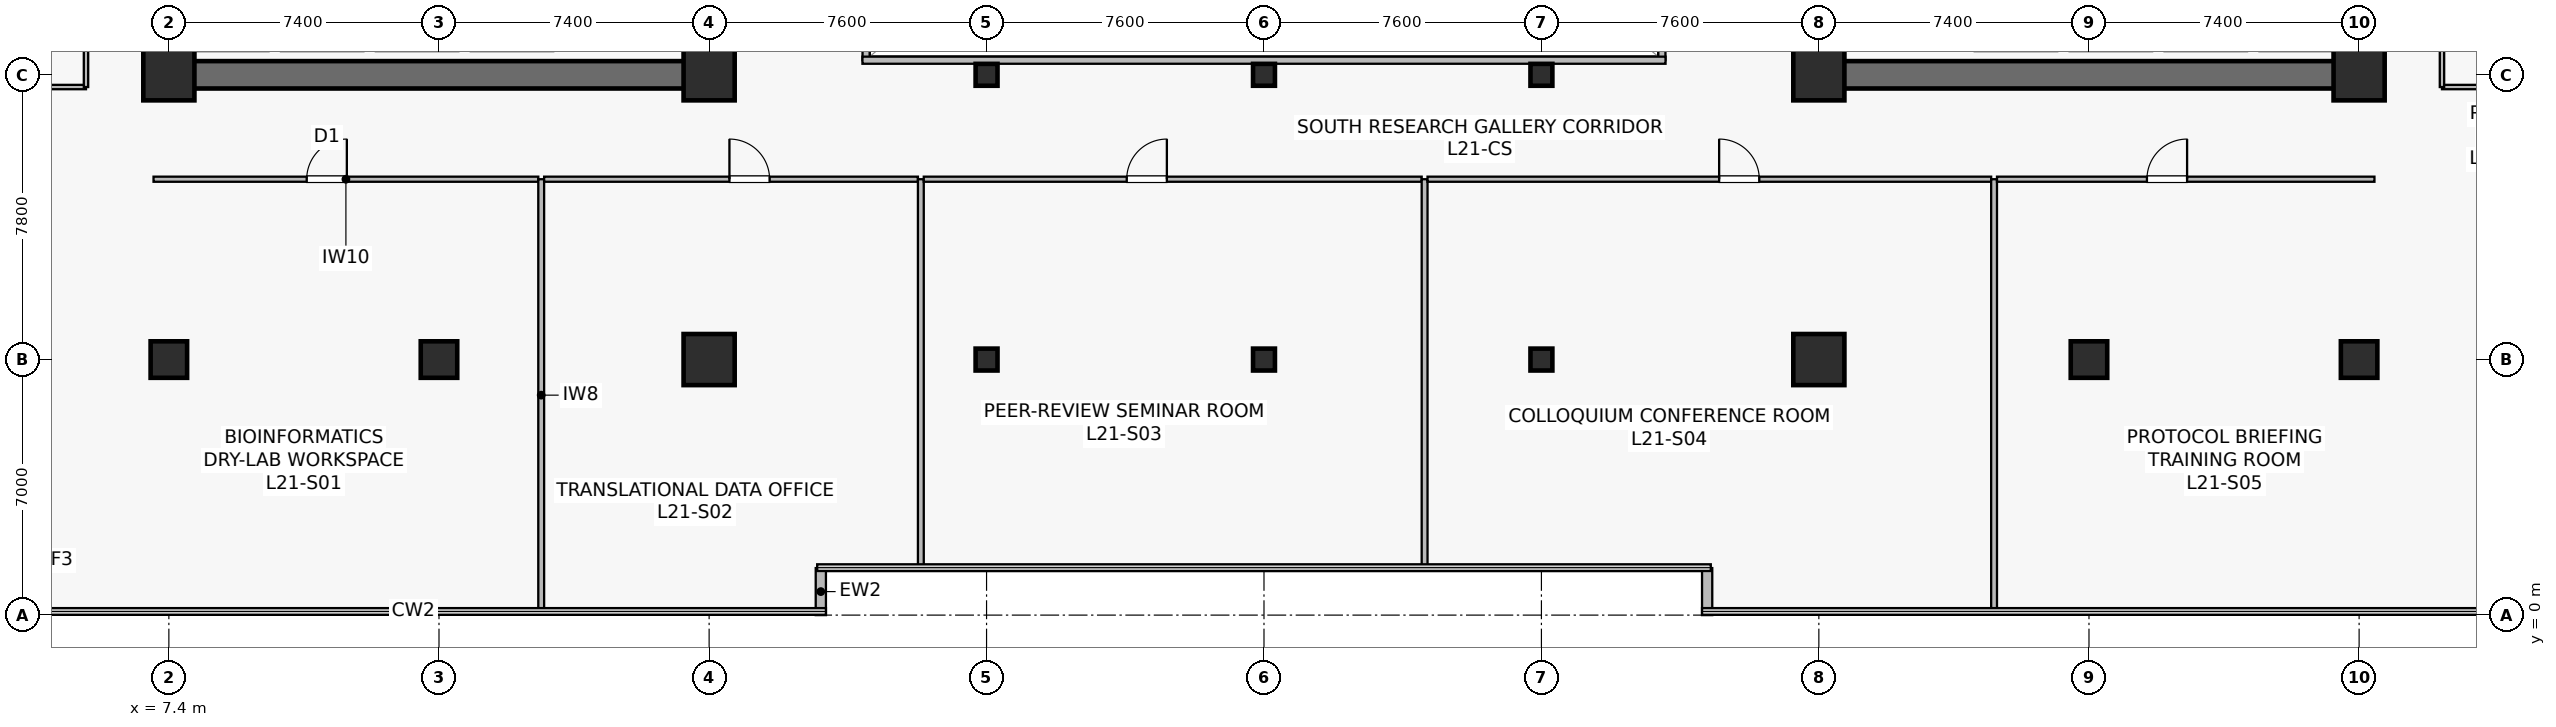
"""IFC4 building model, lengths in metres.
Left out: names, types, materials, properties, quantities, classifications, styles, units other than length and angle.
Written with IfcOpenShell. Run it as: python <this file> out.ifc"""

import sys

from ifc_helpers import new_model, si_unit, direction, frame, frame_2d, origin, origin_2d, place, context, subcontext, project, spatial, rectangle, hollow_rectangle, extrude, source, transform, mapped, element, fill, save


model = new_model("IFC4")
c1 = context("Model", 3, precision=1e-05, world=origin(), true_north=direction((0.0, 1.0)))
c2 = subcontext(c1, "Body", "Model", "MODEL_VIEW")
j1 = project(units=[si_unit("LENGTHUNIT", "METRE"), si_unit("PLANEANGLEUNIT", "RADIAN")], contexts=[c1])
p1 = place(None, origin())
s1 = spatial("IfcSite", under=j1, at=p1, CompositionType="ELEMENT")
p2 = place(p1, origin())
s2 = spatial("IfcBuilding", under=s1, at=p2, CompositionType="ELEMENT")
p3 = place(p2, frame((0.0, 0.0, 86.7)))
s3 = spatial("IfcBuildingStorey", under=s2, at=p3, CompositionType="ELEMENT", Elevation=86.7)
p4 = place(p3, frame((7.025, 14.8, 0.0), z_axis=(0.0, 0.0, 1.0), x_axis=(1.0, 0.0, 0.0)))
e1 = element("IfcWall", 1, at=p4, inside=s3, PredefinedType="SHEAR", context=c2, shape_type="SweptSolid", body=[
    extrude(rectangle(XDim=15.55, YDim=0.75, at=frame_2d((7.775, 0.0))), origin(), (0.0, 0.0, 1.0), 3.78),
])
p5 = place(p3, frame((7.4, 15.175, 0.0), z_axis=(0.0, 0.0, 1.0), x_axis=(0.0, 1.0, 0.0)))
e2 = element("IfcWall", 2, at=p5, inside=s3, PredefinedType="SHEAR", context=c2, shape_type="SweptSolid", body=[
    extrude(rectangle(XDim=18.25, YDim=0.75, at=frame_2d((9.125, 0.0))), origin(), (0.0, 0.0, 1.0), 3.78),
])
p6 = place(p3, frame((22.2, 15.175, 0.0), z_axis=(0.0, 0.0, 1.0), x_axis=(0.0, 1.0, 0.0)))
e3 = element("IfcWall", 3, at=p6, inside=s3, PredefinedType="SHEAR", context=c2, shape_type="SweptSolid", body=[
    extrude(rectangle(XDim=18.25, YDim=0.75, at=frame_2d((9.125, 0.0))), origin(), (0.0, 0.0, 1.0), 3.78),
])
p7 = place(p6, frame((3.375, 0.0, 0.0)))
e4 = element("IfcOpeningElement", 4, at=p7, cuts=e3, PredefinedType="OPENING", context=c2, shape_type="SweptSolid", body=[
    extrude(rectangle(XDim=1.42, YDim=2.2, at=frame_2d((0.71, 1.1))), frame((0.0, 0.385, 0.0), z_axis=(0.0, -1.0, 0.0), x_axis=(1.0, 0.0, 0.0)), (0.0, 0.0, 1.0), 0.77),
])
p8 = place(p3, frame((52.225, 14.8, 0.0), z_axis=(0.0, 0.0, 1.0), x_axis=(1.0, 0.0, 0.0)))
e5 = element("IfcWall", 5, at=p8, inside=s3, PredefinedType="SHEAR", context=c2, shape_type="SweptSolid", body=[
    extrude(rectangle(XDim=15.55, YDim=0.75, at=frame_2d((7.775, 0.0))), origin(), (0.0, 0.0, 1.0), 3.78),
])
p9 = place(p3, frame((52.6, 15.175, 0.0), z_axis=(0.0, 0.0, 1.0), x_axis=(0.0, 1.0, 0.0)))
e6 = element("IfcWall", 6, at=p9, inside=s3, PredefinedType="SHEAR", context=c2, shape_type="SweptSolid", body=[
    extrude(rectangle(XDim=18.25, YDim=0.75, at=frame_2d((9.125, 0.0))), origin(), (0.0, 0.0, 1.0), 3.78),
])
p10 = place(p9, frame((3.375, 0.0, 0.0)))
e7 = element("IfcOpeningElement", 7, at=p10, cuts=e6, PredefinedType="OPENING", context=c2, shape_type="SweptSolid", body=[
    extrude(rectangle(XDim=1.42, YDim=2.2, at=frame_2d((0.71, 1.1))), frame((0.0, 0.385, 0.0), z_axis=(0.0, -1.0, 0.0), x_axis=(1.0, 0.0, 0.0)), (0.0, 0.0, 1.0), 0.77),
])
p11 = place(p3, frame((67.4, 15.175, 0.0), z_axis=(0.0, 0.0, 1.0), x_axis=(0.0, 1.0, 0.0)))
e8 = element("IfcWall", 8, at=p11, inside=s3, PredefinedType="SHEAR", context=c2, shape_type="SweptSolid", body=[
    extrude(rectangle(XDim=18.25, YDim=0.75, at=frame_2d((9.125, 0.0))), origin(), (0.0, 0.0, 1.0), 3.78),
])
m1 = source(origin(), c2, "Body", "SweptSolid", [
    extrude(rectangle(XDim=1.0, YDim=1.0, at=origin_2d()), origin(), (0.0, 0.0, 1.0), 4.1),
])
p12 = place(p3, frame((14.8, 7.0, 0.0), z_axis=(0.0, 0.0, 1.0), x_axis=(1.0, 0.0, 0.0)))
e9 = element("IfcColumn", 9, at=p12, inside=s3, PredefinedType="COLUMN", context=c2, shape_type="MappedRepresentation", body=[
    mapped(m1, transform((0.0, 0.0, 0.0), scale=1.0)),
])
m2 = source(origin(), c2, "Body", "SweptSolid", [
    extrude(rectangle(XDim=1.4, YDim=1.4, at=origin_2d()), origin(), (0.0, 0.0, 1.0), 4.1),
])
for number, where, z_axis, x_axis in (
    (10, (22.2, 7.0, 0.0), (0.0, 0.0, 1.0), (1.0, 0.0, 0.0)),
    (11, (7.4, 14.8, 0.0), (0.0, 0.0, 1.0), (1.0, 0.0, 0.0)),
    (12, (22.2, 14.8, 0.0), (0.0, 0.0, 1.0), (1.0, 0.0, 0.0)),
    (13, (52.6, 7.0, 0.0), (0.0, 0.0, 1.0), (1.0, 0.0, 0.0)),
):
    element("IfcColumn", number, at=place(p3, frame(where, z_axis=z_axis, x_axis=x_axis)), inside=s3, PredefinedType="COLUMN", context=c2, shape_type="MappedRepresentation", body=[
        mapped(m2, transform((0.0, 0.0, 0.0), scale=1.0)),
    ])
p13 = place(p3, frame((60.0, 7.0, 0.0), z_axis=(0.0, 0.0, 1.0), x_axis=(1.0, 0.0, 0.0)))
e14 = element("IfcColumn", 14, at=p13, inside=s3, PredefinedType="COLUMN", context=c2, shape_type="MappedRepresentation", body=[
    mapped(m1, transform((0.0, 0.0, 0.0), scale=1.0)),
])
for number, where, z_axis, x_axis in (
    (15, (52.6, 14.8, 0.0), (0.0, 0.0, 1.0), (1.0, 0.0, 0.0)),
    (16, (67.4, 14.8, 0.0), (0.0, 0.0, 1.0), (1.0, 0.0, 0.0)),
):
    element("IfcColumn", number, at=place(p3, frame(where, z_axis=z_axis, x_axis=x_axis)), inside=s3, PredefinedType="COLUMN", context=c2, shape_type="MappedRepresentation", body=[
        mapped(m2, transform((0.0, 0.0, 0.0), scale=1.0)),
    ])
for number, where, z_axis, x_axis in (
    (17, (7.4, 7.0, 0.0), (0.0, 0.0, 1.0), (1.0, 0.0, 0.0)),
    (18, (67.4, 7.0, 0.0), (0.0, 0.0, 1.0), (1.0, 0.0, 0.0)),
):
    element("IfcColumn", number, at=place(p3, frame(where, z_axis=z_axis, x_axis=x_axis)), inside=s3, PredefinedType="COLUMN", context=c2, shape_type="MappedRepresentation", body=[
        mapped(m1, transform((0.0, 0.0, 0.0), scale=1.0)),
    ])
m3 = source(origin(), c2, "Body", "SweptSolid", [
    extrude(hollow_rectangle(XDim=0.6, YDim=0.6, WallThickness=0.028, at=origin_2d()), origin(), (0.0, 0.0, 1.0), 4.1),
])
for number, where, z_axis, x_axis in (
    (19, (29.8, 7.0, 0.0), (0.0, 0.0, 1.0), (1.0, 0.0, 0.0)),
    (20, (29.8, 14.8, 0.0), (0.0, 0.0, 1.0), (1.0, 0.0, 0.0)),
    (21, (37.4, 7.0, 0.0), (0.0, 0.0, 1.0), (1.0, 0.0, 0.0)),
    (22, (37.4, 14.8, 0.0), (0.0, 0.0, 1.0), (1.0, 0.0, 0.0)),
    (23, (45.0, 7.0, 0.0), (0.0, 0.0, 1.0), (1.0, 0.0, 0.0)),
    (24, (45.0, 14.8, 0.0), (0.0, 0.0, 1.0), (1.0, 0.0, 0.0)),
):
    element("IfcColumn", number, at=place(p3, frame(where, z_axis=z_axis, x_axis=x_axis)), inside=s3, PredefinedType="COLUMN", context=c2, shape_type="MappedRepresentation", body=[
        mapped(m3, transform((0.0, 0.0, 0.0), scale=1.0)),
    ])
for number, where, z_axis, x_axis in (
    (25, (25.26, 0.0, 0.0), (0.0, 0.0, 1.0), (0.0, 1.0, 0.0)),
    (26, (49.54, 1.288, 0.0), (0.0, 0.0, 1.0), (0.0, -1.0, 0.0)),
):
    element("IfcWall", number, at=place(p3, frame(where, z_axis=z_axis, x_axis=x_axis)), inside=s3, PredefinedType="STANDARD", context=c2, shape_type="SweptSolid", body=[
        extrude(rectangle(XDim=1.288, YDim=0.28, at=frame_2d((0.644, 0.0))), origin(), (0.0, 0.0, 1.0), 3.78),
    ])
p14 = place(p3, frame((26.5, 15.2, 0.0), z_axis=(0.0, 0.0, 1.0), x_axis=(0.0, 1.0, 0.0)))
e27 = element("IfcWall", 27, at=p14, inside=s3, PredefinedType="SOLIDWALL", context=c2, shape_type="SweptSolid", body=[
    extrude(rectangle(XDim=18.2, YDim=0.195, at=frame_2d((9.1, 0.0))), origin(), (0.0, 0.0, 1.0), 3.78),
])
p15 = place(p14, frame((1.8, 0.0, 0.9)))
e28 = element("IfcOpeningElement", 28, at=p15, cuts=e27, PredefinedType="OPENING", context=c2, shape_type="SweptSolid", body=[
    extrude(rectangle(XDim=1.2, YDim=1.35, at=frame_2d((0.6, 0.675))), frame((0.0, 0.107, 0.0), z_axis=(0.0, -1.0, 0.0), x_axis=(1.0, 0.0, 0.0)), (0.0, 0.0, 1.0), 0.215),
])
p16 = place(p14, frame((13.2, 0.0, 0.9)))
e29 = element("IfcOpeningElement", 29, at=p16, cuts=e27, PredefinedType="OPENING", context=c2, shape_type="SweptSolid", body=[
    extrude(rectangle(XDim=1.2, YDim=1.35, at=frame_2d((0.6, 0.675))), frame((0.0, 0.107, 0.0), z_axis=(0.0, -1.0, 0.0), x_axis=(1.0, 0.0, 0.0)), (0.0, 0.0, 1.0), 0.215),
])
p17 = place(p3, frame((48.3, 15.2, 0.0), z_axis=(0.0, 0.0, 1.0), x_axis=(0.0, 1.0, 0.0)))
e30 = element("IfcWall", 30, at=p17, inside=s3, PredefinedType="SOLIDWALL", context=c2, shape_type="SweptSolid", body=[
    extrude(rectangle(XDim=18.2, YDim=0.195, at=frame_2d((9.1, 0.0))), origin(), (0.0, 0.0, 1.0), 3.78),
])
p18 = place(p17, frame((1.8, 0.0, 0.9)))
e31 = element("IfcOpeningElement", 31, at=p18, cuts=e30, PredefinedType="OPENING", context=c2, shape_type="SweptSolid", body=[
    extrude(rectangle(XDim=1.2, YDim=1.35, at=frame_2d((0.6, 0.675))), frame((0.0, 0.107, 0.0), z_axis=(0.0, -1.0, 0.0), x_axis=(1.0, 0.0, 0.0)), (0.0, 0.0, 1.0), 0.215),
])
p19 = place(p17, frame((13.2, 0.0, 0.9)))
e32 = element("IfcOpeningElement", 32, at=p19, cuts=e30, PredefinedType="OPENING", context=c2, shape_type="SweptSolid", body=[
    extrude(rectangle(XDim=1.2, YDim=1.35, at=frame_2d((0.6, 0.675))), frame((0.0, 0.107, 0.0), z_axis=(0.0, -1.0, 0.0), x_axis=(1.0, 0.0, 0.0)), (0.0, 0.0, 1.0), 0.215),
])
p20 = place(p3, frame((26.4, 15.2, 0.0), z_axis=(0.0, 0.0, 1.0), x_axis=(1.0, 0.0, 0.0)))
e33 = element("IfcWall", 33, at=p20, inside=s3, PredefinedType="SOLIDWALL", context=c2, shape_type="SweptSolid", body=[
    extrude(rectangle(XDim=22.0, YDim=0.195, at=frame_2d((11.0, 0.0))), origin(), (0.0, 0.0, 1.0), 3.78),
])
p21 = place(p3, frame((6.98, 11.94, 0.0), z_axis=(0.0, 0.0, 1.0), x_axis=(1.0, 0.0, 0.0)))
e34 = element("IfcWall", 34, at=p21, inside=s3, PredefinedType="PARTITIONING", context=c2, shape_type="SweptSolid", body=[
    extrude(rectangle(XDim=10.54, YDim=0.14, at=frame_2d((5.27, 0.0))), origin(), (0.0, 0.0, 1.0), 3.115),
])
p22 = place(p21, frame((4.196, 0.0, 0.0)))
e35 = element("IfcOpeningElement", 35, at=p22, cuts=e34, PredefinedType="OPENING", context=c2, shape_type="SweptSolid", body=[
    extrude(rectangle(XDim=1.1, YDim=2.18, at=frame_2d((0.55, 1.09))), frame((0.0, 0.08, 0.0), z_axis=(0.0, -1.0, 0.0), x_axis=(1.0, 0.0, 0.0)), (0.0, 0.0, 1.0), 0.16),
])
p23 = place(p3, frame((17.6, 0.11, 0.0), z_axis=(0.0, 0.0, 1.0), x_axis=(0.0, 1.0, 0.0)))
e36 = element("IfcWall", 36, at=p23, inside=s3, PredefinedType="PARTITIONING", context=c2, shape_type="SweptSolid", body=[
    extrude(rectangle(XDim=11.83, YDim=0.16, at=frame_2d((5.915, 0.0))), origin(), (0.0, 0.0, 1.0), 3.015),
])
p24 = place(p3, frame((17.68, 11.94, 0.0), z_axis=(0.0, 0.0, 1.0), x_axis=(1.0, 0.0, 0.0)))
e37 = element("IfcWall", 37, at=p24, inside=s3, PredefinedType="PARTITIONING", context=c2, shape_type="SweptSolid", body=[
    extrude(rectangle(XDim=10.24, YDim=0.14, at=frame_2d((5.12, 0.0))), origin(), (0.0, 0.0, 1.0), 3.115),
])
p25 = place(p24, frame((5.076, 0.0, 0.0)))
e38 = element("IfcOpeningElement", 38, at=p25, cuts=e37, PredefinedType="OPENING", context=c2, shape_type="SweptSolid", body=[
    extrude(rectangle(XDim=1.1, YDim=2.18, at=frame_2d((0.55, 1.09))), frame((0.0, 0.08, 0.0), z_axis=(0.0, -1.0, 0.0), x_axis=(1.0, 0.0, 0.0)), (0.0, 0.0, 1.0), 0.16),
])
p26 = place(p3, frame((28.0, 1.31, 0.0), z_axis=(0.0, 0.0, 1.0), x_axis=(0.0, 1.0, 0.0)))
e39 = element("IfcWall", 39, at=p26, inside=s3, PredefinedType="PARTITIONING", context=c2, shape_type="SweptSolid", body=[
    extrude(rectangle(XDim=10.63, YDim=0.16, at=frame_2d((5.315, 0.0))), origin(), (0.0, 0.0, 1.0), 3.015),
])
p27 = place(p3, frame((28.08, 11.94, 0.0), z_axis=(0.0, 0.0, 1.0), x_axis=(1.0, 0.0, 0.0)))
e40 = element("IfcWall", 40, at=p27, inside=s3, PredefinedType="PARTITIONING", context=c2, shape_type="SweptSolid", body=[
    extrude(rectangle(XDim=13.64, YDim=0.14, at=frame_2d((6.82, 0.0))), origin(), (0.0, 0.0, 1.0), 3.115),
])
p28 = place(p27, frame((5.56, 0.0, 0.0)))
e41 = element("IfcOpeningElement", 41, at=p28, cuts=e40, PredefinedType="OPENING", context=c2, shape_type="SweptSolid", body=[
    extrude(rectangle(XDim=1.1, YDim=2.18, at=frame_2d((0.55, 1.09))), frame((0.0, 0.08, 0.0), z_axis=(0.0, -1.0, 0.0), x_axis=(1.0, 0.0, 0.0)), (0.0, 0.0, 1.0), 0.16),
])
p29 = place(p3, frame((41.8, 1.31, 0.0), z_axis=(0.0, 0.0, 1.0), x_axis=(0.0, 1.0, 0.0)))
e42 = element("IfcWall", 42, at=p29, inside=s3, PredefinedType="PARTITIONING", context=c2, shape_type="SweptSolid", body=[
    extrude(rectangle(XDim=10.63, YDim=0.16, at=frame_2d((5.315, 0.0))), origin(), (0.0, 0.0, 1.0), 3.015),
])
p30 = place(p3, frame((41.88, 11.94, 0.0), z_axis=(0.0, 0.0, 1.0), x_axis=(1.0, 0.0, 0.0)))
e43 = element("IfcWall", 43, at=p30, inside=s3, PredefinedType="PARTITIONING", context=c2, shape_type="SweptSolid", body=[
    extrude(rectangle(XDim=15.44, YDim=0.14, at=frame_2d((7.72, 0.0))), origin(), (0.0, 0.0, 1.0), 3.115),
])
p31 = place(p30, frame((7.988, 0.0, 0.0)))
e44 = element("IfcOpeningElement", 44, at=p31, cuts=e43, PredefinedType="OPENING", context=c2, shape_type="SweptSolid", body=[
    extrude(rectangle(XDim=1.1, YDim=2.18, at=frame_2d((0.55, 1.09))), frame((0.0, 0.08, 0.0), z_axis=(0.0, -1.0, 0.0), x_axis=(1.0, 0.0, 0.0)), (0.0, 0.0, 1.0), 0.16),
])
p32 = place(p3, frame((57.4, 0.11, 0.0), z_axis=(0.0, 0.0, 1.0), x_axis=(0.0, 1.0, 0.0)))
e45 = element("IfcWall", 45, at=p32, inside=s3, PredefinedType="PARTITIONING", context=c2, shape_type="SweptSolid", body=[
    extrude(rectangle(XDim=11.83, YDim=0.16, at=frame_2d((5.915, 0.0))), origin(), (0.0, 0.0, 1.0), 3.015),
])
p33 = place(p3, frame((57.48, 11.94, 0.0), z_axis=(0.0, 0.0, 1.0), x_axis=(1.0, 0.0, 0.0)))
e46 = element("IfcWall", 46, at=p33, inside=s3, PredefinedType="PARTITIONING", context=c2, shape_type="SweptSolid", body=[
    extrude(rectangle(XDim=10.34, YDim=0.14, at=frame_2d((5.17, 0.0))), origin(), (0.0, 0.0, 1.0), 3.115),
])
p34 = place(p33, frame((4.108, 0.0, 0.0)))
e47 = element("IfcOpeningElement", 47, at=p34, cuts=e46, PredefinedType="OPENING", context=c2, shape_type="SweptSolid", body=[
    extrude(rectangle(XDim=1.1, YDim=2.18, at=frame_2d((0.55, 1.09))), frame((0.0, 0.08, 0.0), z_axis=(0.0, -1.0, 0.0), x_axis=(1.0, 0.0, 0.0)), (0.0, 0.0, 1.0), 0.16),
])
p35 = place(p3, frame((0.11, 14.465, 0.0), z_axis=(0.0, 0.0, 1.0), x_axis=(1.0, 0.0, 0.0)))
e48 = element("IfcWall", 48, at=p35, inside=s3, PredefinedType="PARTITIONING", context=c2, shape_type="SweptSolid", body=[
    extrude(rectangle(XDim=5.02, YDim=0.12, at=frame_2d((2.51, 0.0))), origin(), (0.0, 0.0, 1.0), 3.78),
])
p36 = place(p3, frame((5.13, 14.465, 0.0), z_axis=(0.0, 0.0, 1.0), x_axis=(0.0, 1.0, 0.0)))
e49 = element("IfcWall", 49, at=p36, inside=s3, PredefinedType="PARTITIONING", context=c2, shape_type="SweptSolid", body=[
    extrude(rectangle(XDim=9.275, YDim=0.12, at=frame_2d((4.637, 0.0))), origin(), (0.0, 0.0, 1.0), 3.78),
])
p37 = place(p36, frame((4.188, 0.0, 0.0)))
e50 = element("IfcOpeningElement", 50, at=p37, cuts=e49, PredefinedType="OPENING", context=c2, shape_type="SweptSolid", body=[
    extrude(rectangle(XDim=0.9, YDim=2.1, at=frame_2d((0.45, 1.05))), frame((0.0, 0.07, 0.0), z_axis=(0.0, -1.0, 0.0), x_axis=(1.0, 0.0, 0.0)), (0.0, 0.0, 1.0), 0.14),
])
p38 = place(p3, frame((69.67, 14.465, 0.0), z_axis=(0.0, 0.0, 1.0), x_axis=(1.0, 0.0, 0.0)))
e51 = element("IfcWall", 51, at=p38, inside=s3, PredefinedType="PARTITIONING", context=c2, shape_type="SweptSolid", body=[
    extrude(rectangle(XDim=5.02, YDim=0.12, at=frame_2d((2.51, 0.0))), origin(), (0.0, 0.0, 1.0), 3.78),
])
p39 = place(p3, frame((69.67, 14.465, 0.0), z_axis=(0.0, 0.0, 1.0), x_axis=(0.0, 1.0, 0.0)))
e52 = element("IfcWall", 52, at=p39, inside=s3, PredefinedType="PARTITIONING", context=c2, shape_type="SweptSolid", body=[
    extrude(rectangle(XDim=5.675, YDim=0.12, at=frame_2d((2.837, 0.0))), origin(), (0.0, 0.0, 1.0), 3.78),
])
p40 = place(p39, frame((2.387, 0.0, 0.0)))
e53 = element("IfcOpeningElement", 53, at=p40, cuts=e52, PredefinedType="OPENING", context=c2, shape_type="SweptSolid", body=[
    extrude(rectangle(XDim=0.9, YDim=2.1, at=frame_2d((0.45, 1.05))), frame((0.0, 0.07, 0.0), z_axis=(0.0, -1.0, 0.0), x_axis=(1.0, 0.0, 0.0)), (0.0, 0.0, 1.0), 0.14),
])
m4 = source(origin(), c2, "Body", "SweptSolid", [
    extrude(rectangle(XDim=1.1, YDim=2.18, at=frame_2d((0.55, 1.09))), frame((0.0, 0.025, 0.0), z_axis=(0.0, -1.0, 0.0), x_axis=(1.0, 0.0, 0.0)), (0.0, 0.0, 1.0), 0.05),
])
p41 = place(p22, origin())
e54 = element("IfcDoor", 54, at=p41, inside=s3, OperationType="SINGLE_SWING_RIGHT", PredefinedType="DOOR", context=c2, shape_type="MappedRepresentation", body=[
    mapped(m4, transform((0.0, 0.0, 0.0), scale=1.0)),
])
fill(e35, e54)
p42 = place(p25, origin())
e55 = element("IfcDoor", 55, at=p42, inside=s3, OperationType="SINGLE_SWING_LEFT", PredefinedType="DOOR", context=c2, shape_type="MappedRepresentation", body=[
    mapped(m4, transform((0.0, 0.0, 0.0), scale=1.0)),
])
fill(e38, e55)
p43 = place(p28, origin())
e56 = element("IfcDoor", 56, at=p43, inside=s3, OperationType="SINGLE_SWING_RIGHT", PredefinedType="DOOR", context=c2, shape_type="MappedRepresentation", body=[
    mapped(m4, transform((0.0, 0.0, 0.0), scale=1.0)),
])
fill(e41, e56)
p44 = place(p31, origin())
e57 = element("IfcDoor", 57, at=p44, inside=s3, OperationType="SINGLE_SWING_LEFT", PredefinedType="DOOR", context=c2, shape_type="MappedRepresentation", body=[
    mapped(m4, transform((0.0, 0.0, 0.0), scale=1.0)),
])
fill(e44, e57)
p45 = place(p34, origin())
e58 = element("IfcDoor", 58, at=p45, inside=s3, OperationType="SINGLE_SWING_RIGHT", PredefinedType="DOOR", context=c2, shape_type="MappedRepresentation", body=[
    mapped(m4, transform((0.0, 0.0, 0.0), scale=1.0)),
])
fill(e47, e58)
save(model, sys.argv[1])
